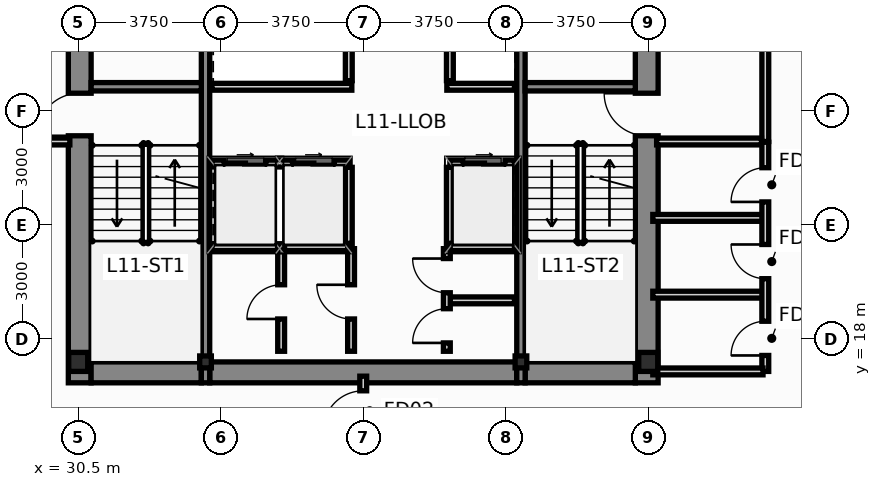
"""IFC4 building model, lengths in metres.
Left out: names, types, materials, properties, quantities, classifications, styles, units other than length and angle.
Written with IfcOpenShell. Run it as: python <this file> out.ifc"""

import sys

from ifc_helpers import new_model, si_unit, direction, frame, frame_2d, origin, origin_2d, place, context, subcontext, project, spatial, rectangle, i_section, extrude, source, transform, mapped, element, fill, save


model = new_model("IFC4")
c1 = context("Model", 3, precision=1e-05, world=origin(), true_north=direction((0.0, 1.0)))
c2 = subcontext(c1, "Body", "Model", "MODEL_VIEW")
j1 = project(units=[si_unit("LENGTHUNIT", "METRE"), si_unit("PLANEANGLEUNIT", "RADIAN")], contexts=[c1])
p1 = place(None, origin())
s1 = spatial("IfcSite", under=j1, at=p1, CompositionType="ELEMENT")
p2 = place(p1, origin())
s2 = spatial("IfcBuilding", under=s1, at=p2, CompositionType="ELEMENT")
p3 = place(p2, frame((0.0, 0.0, 45.85)))
s3 = spatial("IfcBuildingStorey", under=s2, at=p3, CompositionType="ELEMENT", Elevation=45.85)
m1 = source(origin(), c2, "Body", "SweptSolid", [
    extrude(i_section(OverallWidth=0.5, OverallDepth=0.5, WebThickness=0.028, FlangeThickness=0.04, at=origin_2d()), origin(), (0.0, 0.0, 1.0), 3.65),
])
for number, where, z_axis, x_axis in (
    (1, (30.5, 17.4, 0.0), (0.0, 0.0, 1.0), (1.0, 0.0, 0.0)),
    (2, (45.5, 17.4, 0.0), (0.0, 0.0, 1.0), (1.0, 0.0, 0.0)),
):
    element("IfcColumn", number, at=place(p3, frame(where, z_axis=z_axis, x_axis=x_axis)), inside=s3, PredefinedType="COLUMN", context=c2, shape_type="MappedRepresentation", body=[
        mapped(m1, transform((0.0, 0.0, 0.0), scale=1.0)),
    ])
m2 = source(origin(), c2, "Body", "SweptSolid", [
    extrude(i_section(OverallWidth=0.307, OverallDepth=0.315, WebThickness=0.012, FlangeThickness=0.019, at=origin_2d()), origin(), (0.0, 0.0, 1.0), 3.65),
])
for number, where, z_axis, x_axis in (
    (3, (33.85, 17.4, 0.0), (0.0, 0.0, 1.0), (1.0, 0.0, 0.0)),
    (4, (42.15, 17.4, 0.0), (0.0, 0.0, 1.0), (1.0, 0.0, 0.0)),
):
    element("IfcColumn", number, at=place(p3, frame(where, z_axis=z_axis, x_axis=x_axis)), inside=s3, PredefinedType="COLUMN", context=c2, shape_type="MappedRepresentation", body=[
        mapped(m2, transform((0.0, 0.0, 0.0), scale=1.0)),
    ])
p4 = place(p3, frame((30.54, 16.85, 0.0), z_axis=(0.0, 0.0, 1.0), x_axis=(0.0, 1.0, 0.0)))
e5 = element("IfcWall", 5, at=p4, inside=s3, PredefinedType="SHEAR", context=c2, shape_type="SweptSolid", body=[
    extrude(rectangle(XDim=13.425, YDim=0.6, at=frame_2d((6.712, 0.0))), origin(), (0.0, 0.0, 1.0), 3.65),
])
p5 = place(p4, frame((6.5, 0.0, 0.0)))
e6 = element("IfcOpeningElement", 6, at=p5, cuts=e5, PredefinedType="OPENING", context=c2, shape_type="SweptSolid", body=[
    extrude(rectangle(XDim=1.12, YDim=2.15, at=frame_2d((0.56, 1.075))), frame((0.0, 0.312, 0.0), z_axis=(0.0, -1.0, 0.0), x_axis=(1.0, 0.0, 0.0)), (0.0, 0.0, 1.0), 0.624),
])
p6 = place(p4, frame((10.95, 0.0, 0.0)))
e7 = element("IfcOpeningElement", 7, at=p6, cuts=e5, PredefinedType="OPENING", context=c2, shape_type="SweptSolid", body=[
    extrude(rectangle(XDim=1.2, YDim=2.2, at=frame_2d((0.6, 1.1))), frame((0.0, 0.312, 0.0), z_axis=(0.0, -1.0, 0.0), x_axis=(1.0, 0.0, 0.0)), (0.0, 0.0, 1.0), 0.624),
])
p7 = place(p3, frame((45.46, 16.85, 0.0), z_axis=(0.0, 0.0, 1.0), x_axis=(0.0, 1.0, 0.0)))
e8 = element("IfcWall", 8, at=p7, inside=s3, PredefinedType="SHEAR", context=c2, shape_type="SweptSolid", body=[
    extrude(rectangle(XDim=13.425, YDim=0.6, at=frame_2d((6.712, 0.0))), origin(), (0.0, 0.0, 1.0), 3.65),
])
p8 = place(p7, frame((6.5, 0.0, 0.0)))
e9 = element("IfcOpeningElement", 9, at=p8, cuts=e8, PredefinedType="OPENING", context=c2, shape_type="SweptSolid", body=[
    extrude(rectangle(XDim=1.12, YDim=2.15, at=frame_2d((0.56, 1.075))), frame((0.0, 0.312, 0.0), z_axis=(0.0, -1.0, 0.0), x_axis=(1.0, 0.0, 0.0)), (0.0, 0.0, 1.0), 0.624),
])
p9 = place(p7, frame((10.95, 0.0, 0.0)))
e10 = element("IfcOpeningElement", 10, at=p9, cuts=e8, PredefinedType="OPENING", context=c2, shape_type="SweptSolid", body=[
    extrude(rectangle(XDim=1.2, YDim=2.2, at=frame_2d((0.6, 1.1))), frame((0.0, 0.312, 0.0), z_axis=(0.0, -1.0, 0.0), x_axis=(1.0, 0.0, 0.0)), (0.0, 0.0, 1.0), 0.624),
])
p10 = place(p3, frame((30.84, 17.125, 0.0), z_axis=(0.0, 0.0, 1.0), x_axis=(1.0, 0.0, 0.0)))
e11 = element("IfcWall", 11, at=p10, inside=s3, PredefinedType="SHEAR", context=c2, shape_type="SweptSolid", body=[
    extrude(rectangle(XDim=2.9, YDim=0.55, at=frame_2d((1.45, 0.0))), origin(), (0.0, 0.0, 1.0), 3.65),
])
p11 = place(p3, frame((33.96, 17.125, 0.0), z_axis=(0.0, 0.0, 1.0), x_axis=(1.0, 0.0, 0.0)))
e12 = element("IfcWall", 12, at=p11, inside=s3, PredefinedType="SHEAR", context=c2, shape_type="SweptSolid", body=[
    extrude(rectangle(XDim=8.08, YDim=0.55, at=frame_2d((4.04, 0.0))), origin(), (0.0, 0.0, 1.0), 3.65),
])
p12 = place(p3, frame((42.26, 17.125, 0.0), z_axis=(0.0, 0.0, 1.0), x_axis=(1.0, 0.0, 0.0)))
e13 = element("IfcWall", 13, at=p12, inside=s3, PredefinedType="SHEAR", context=c2, shape_type="SweptSolid", body=[
    extrude(rectangle(XDim=2.9, YDim=0.55, at=frame_2d((1.45, 0.0))), origin(), (0.0, 0.0, 1.0), 3.65),
])
for number, where, z_axis, x_axis in (
    (14, (33.85, 16.85, 0.0), (0.0, 0.0, 1.0), (0.0, 1.0, 0.0)),
    (15, (42.15, 16.85, 0.0), (0.0, 0.0, 1.0), (0.0, 1.0, 0.0)),
):
    element("IfcWall", number, at=place(p3, frame(where, z_axis=z_axis, x_axis=x_axis)), inside=s3, PredefinedType="SHEAR", context=c2, shape_type="SweptSolid", body=[
        extrude(rectangle(XDim=13.425, YDim=0.22, at=frame_2d((6.712, 0.0))), origin(), (0.0, 0.0, 1.0), 3.65),
    ])
for number, where, z_axis, x_axis in (
    (16, (30.84, 24.64, 0.0), (0.0, 0.0, 1.0), (1.0, 0.0, 0.0)),
    (17, (42.26, 24.64, 0.0), (0.0, 0.0, 1.0), (1.0, 0.0, 0.0)),
):
    element("IfcWall", number, at=place(p3, frame(where, z_axis=z_axis, x_axis=x_axis)), inside=s3, PredefinedType="SHEAR", context=c2, shape_type="SweptSolid", body=[
        extrude(rectangle(XDim=2.9, YDim=0.22, at=frame_2d((1.45, 0.0))), origin(), (0.0, 0.0, 1.0), 3.65),
    ])
p13 = place(p3, frame((34.02, 22.62, 0.0), z_axis=(0.0, 0.0, 1.0), x_axis=(1.0, 0.0, 0.0)))
e18 = element("IfcWall", 18, at=p13, inside=s3, PredefinedType="PARTITIONING", context=c2, shape_type="SweptSolid", body=[
    extrude(rectangle(XDim=3.6, YDim=0.18, at=frame_2d((1.8, 0.0))), origin(), (0.0, 0.0, 1.0), 3.4),
])
p14 = place(p13, frame((0.32, 0.0, 0.0)))
e19 = element("IfcOpeningElement", 19, at=p14, cuts=e18, PredefinedType="OPENING", context=c2, shape_type="SweptSolid", body=[
    extrude(rectangle(XDim=1.1, YDim=2.2, at=frame_2d((0.55, 1.1))), frame((0.0, 0.102, 0.0), z_axis=(0.0, -1.0, 0.0), x_axis=(1.0, 0.0, 0.0)), (0.0, 0.0, 1.0), 0.204),
])
p15 = place(p13, frame((2.12, 0.0, 0.0)))
e20 = element("IfcOpeningElement", 20, at=p15, cuts=e18, PredefinedType="OPENING", context=c2, shape_type="SweptSolid", body=[
    extrude(rectangle(XDim=1.1, YDim=2.2, at=frame_2d((0.55, 1.1))), frame((0.0, 0.102, 0.0), z_axis=(0.0, -1.0, 0.0), x_axis=(1.0, 0.0, 0.0)), (0.0, 0.0, 1.0), 0.204),
])
p16 = place(p3, frame((40.28, 22.62, 0.0), z_axis=(0.0, 0.0, 1.0), x_axis=(1.0, 0.0, 0.0)))
e21 = element("IfcWall", 21, at=p16, inside=s3, PredefinedType="PARTITIONING", context=c2, shape_type="SweptSolid", body=[
    extrude(rectangle(XDim=1.7, YDim=0.18, at=frame_2d((0.85, 0.0))), origin(), (0.0, 0.0, 1.0), 3.4),
])
p17 = place(p16, frame((0.35, 0.0, 0.0)))
e22 = element("IfcOpeningElement", 22, at=p17, cuts=e21, PredefinedType="OPENING", context=c2, shape_type="SweptSolid", body=[
    extrude(rectangle(XDim=1.1, YDim=2.2, at=frame_2d((0.55, 1.1))), frame((0.0, 0.102, 0.0), z_axis=(0.0, -1.0, 0.0), x_axis=(1.0, 0.0, 0.0)), (0.0, 0.0, 1.0), 0.204),
])
for number, where, z_axis, x_axis in (
    (23, (37.62, 20.52, 0.0), (0.0, 0.0, 1.0), (0.0, 1.0, 0.0)),
    (24, (40.28, 20.52, 0.0), (0.0, 0.0, 1.0), (0.0, 1.0, 0.0)),
    (25, (37.62, 24.8, 0.0), (0.0, 0.0, 1.0), (0.0, 1.0, 0.0)),
    (26, (40.28, 24.8, 0.0), (0.0, 0.0, 1.0), (0.0, 1.0, 0.0)),
):
    element("IfcWall", number, at=place(p3, frame(where, z_axis=z_axis, x_axis=x_axis)), inside=s3, PredefinedType="PARTITIONING", context=c2, shape_type="SweptSolid", body=[
        extrude(rectangle(XDim=2.0, YDim=0.18, at=frame_2d((1.0, 0.0))), origin(), (0.0, 0.0, 1.0), 3.4),
    ])
p18 = place(p3, frame((34.02, 24.64, 0.0), z_axis=(0.0, 0.0, 1.0), x_axis=(1.0, 0.0, 0.0)))
e27 = element("IfcWall", 27, at=p18, inside=s3, PredefinedType="PARTITIONING", context=c2, shape_type="SweptSolid", body=[
    extrude(rectangle(XDim=3.68, YDim=0.18, at=frame_2d((1.84, 0.0))), origin(), (0.0, 0.0, 1.0), 3.4),
])
p19 = place(p3, frame((40.2, 24.64, 0.0), z_axis=(0.0, 0.0, 1.0), x_axis=(1.0, 0.0, 0.0)))
e28 = element("IfcWall", 28, at=p19, inside=s3, PredefinedType="PARTITIONING", context=c2, shape_type="SweptSolid", body=[
    extrude(rectangle(XDim=1.78, YDim=0.18, at=frame_2d((0.89, 0.0))), origin(), (0.0, 0.0, 1.0), 3.4),
])
p20 = place(p3, frame((27.52, 23.2, 0.0), z_axis=(0.0, 0.0, 1.0), x_axis=(1.0, 0.0, 0.0)))
e29 = element("IfcWall", 29, at=p20, inside=s3, PredefinedType="PARTITIONING", context=c2, shape_type="SweptSolid", body=[
    extrude(rectangle(XDim=2.76, YDim=0.18, at=frame_2d((1.38, 0.0))), origin(), (0.0, 0.0, 1.0), 3.4),
])
p21 = place(p3, frame((48.58, 23.2, 0.0), z_axis=(0.0, 0.0, 1.0), x_axis=(0.0, 1.0, 0.0)))
e30 = element("IfcWall", 30, at=p21, inside=s3, PredefinedType="PARTITIONING", context=c2, shape_type="SweptSolid", body=[
    extrude(rectangle(XDim=6.4, YDim=0.18, at=frame_2d((3.2, 0.0))), origin(), (0.0, 0.0, 1.0), 3.026),
])
p22 = place(p21, frame((2.65, 0.0, 0.0)))
e31 = element("IfcOpeningElement", 31, at=p22, cuts=e30, PredefinedType="OPENING", context=c2, shape_type="SweptSolid", body=[
    extrude(rectangle(XDim=1.05, YDim=2.15, at=frame_2d((0.525, 1.075))), frame((0.0, 0.102, 0.0), z_axis=(0.0, -1.0, 0.0), x_axis=(1.0, 0.0, 0.0)), (0.0, 0.0, 1.0), 0.204),
])
p23 = place(p3, frame((45.72, 23.2, 0.0), z_axis=(0.0, 0.0, 1.0), x_axis=(1.0, 0.0, 0.0)))
e32 = element("IfcWall", 32, at=p23, inside=s3, PredefinedType="PARTITIONING", context=c2, shape_type="SweptSolid", body=[
    extrude(rectangle(XDim=2.76, YDim=0.18, at=frame_2d((1.38, 0.0))), origin(), (0.0, 0.0, 1.0), 3.4),
])
p24 = place(p3, frame((34.02, 20.42, 0.0), z_axis=(0.0, 0.0, 1.0), x_axis=(1.0, 0.0, 0.0)))
e33 = element("IfcWall", 33, at=p24, inside=s3, PredefinedType="PARTITIONING", context=c2, shape_type="SweptSolid", body=[
    extrude(rectangle(XDim=3.64, YDim=0.18, at=frame_2d((1.82, 0.0))), origin(), (0.0, 0.0, 1.0), 3.4),
])
p25 = place(p3, frame((40.22, 20.42, 0.0), z_axis=(0.0, 0.0, 1.0), x_axis=(1.0, 0.0, 0.0)))
e34 = element("IfcWall", 34, at=p25, inside=s3, PredefinedType="PARTITIONING", context=c2, shape_type="SweptSolid", body=[
    extrude(rectangle(XDim=1.76, YDim=0.18, at=frame_2d((0.88, 0.0))), origin(), (0.0, 0.0, 1.0), 3.4),
])
p26 = place(p3, frame((35.84, 17.68, 0.0), z_axis=(0.0, 0.0, 1.0), x_axis=(0.0, 1.0, 0.0)))
e35 = element("IfcWall", 35, at=p26, inside=s3, PredefinedType="PARTITIONING", context=c2, shape_type="SweptSolid", body=[
    extrude(rectangle(XDim=2.7, YDim=0.18, at=frame_2d((1.35, 0.0))), origin(), (0.0, 0.0, 1.0), 3.4),
])
p27 = place(p26, frame((0.85, 0.0, 0.0)))
e36 = element("IfcOpeningElement", 36, at=p27, cuts=e35, PredefinedType="OPENING", context=c2, shape_type="SweptSolid", body=[
    extrude(rectangle(XDim=0.9, YDim=2.1, at=frame_2d((0.45, 1.05))), frame((0.0, 0.102, 0.0), z_axis=(0.0, -1.0, 0.0), x_axis=(1.0, 0.0, 0.0)), (0.0, 0.0, 1.0), 0.204),
])
p28 = place(p3, frame((37.68, 17.68, 0.0), z_axis=(0.0, 0.0, 1.0), x_axis=(0.0, 1.0, 0.0)))
e37 = element("IfcWall", 37, at=p28, inside=s3, PredefinedType="PARTITIONING", context=c2, shape_type="SweptSolid", body=[
    extrude(rectangle(XDim=2.7, YDim=0.18, at=frame_2d((1.35, 0.0))), origin(), (0.0, 0.0, 1.0), 3.4),
])
p29 = place(p28, frame((0.85, 0.0, 0.0)))
e38 = element("IfcOpeningElement", 38, at=p29, cuts=e37, PredefinedType="OPENING", context=c2, shape_type="SweptSolid", body=[
    extrude(rectangle(XDim=0.9, YDim=2.1, at=frame_2d((0.45, 1.05))), frame((0.0, 0.102, 0.0), z_axis=(0.0, -1.0, 0.0), x_axis=(1.0, 0.0, 0.0)), (0.0, 0.0, 1.0), 0.204),
])
p30 = place(p3, frame((40.28, 19.02, 0.0), z_axis=(0.0, 0.0, 1.0), x_axis=(1.0, 0.0, 0.0)))
e39 = element("IfcWall", 39, at=p30, inside=s3, PredefinedType="PARTITIONING", context=c2, shape_type="SweptSolid", body=[
    extrude(rectangle(XDim=1.7, YDim=0.18, at=frame_2d((0.85, 0.0))), origin(), (0.0, 0.0, 1.0), 3.4),
])
p31 = place(p3, frame((40.2, 17.68, 0.0), z_axis=(0.0, 0.0, 1.0), x_axis=(0.0, 1.0, 0.0)))
e40 = element("IfcWall", 40, at=p31, inside=s3, PredefinedType="PARTITIONING", context=c2, shape_type="SweptSolid", body=[
    extrude(rectangle(XDim=2.7, YDim=0.18, at=frame_2d((1.35, 0.0))), origin(), (0.0, 0.0, 1.0), 3.4),
])
p32 = place(p31, frame((0.22, 0.0, 0.0)))
e41 = element("IfcOpeningElement", 41, at=p32, cuts=e40, PredefinedType="OPENING", context=c2, shape_type="SweptSolid", body=[
    extrude(rectangle(XDim=0.9, YDim=2.1, at=frame_2d((0.45, 1.05))), frame((0.0, 0.102, 0.0), z_axis=(0.0, -1.0, 0.0), x_axis=(1.0, 0.0, 0.0)), (0.0, 0.0, 1.0), 0.204),
])
p33 = place(p31, frame((1.54, 0.0, 0.0)))
e42 = element("IfcOpeningElement", 42, at=p33, cuts=e40, PredefinedType="OPENING", context=c2, shape_type="SweptSolid", body=[
    extrude(rectangle(XDim=0.9, YDim=2.1, at=frame_2d((0.45, 1.05))), frame((0.0, 0.102, 0.0), z_axis=(0.0, -1.0, 0.0), x_axis=(1.0, 0.0, 0.0)), (0.0, 0.0, 1.0), 0.204),
])
for number, where, z_axis, x_axis in (
    (43, (45.62, 19.17, 0.0), (0.0, 0.0, 1.0), (1.0, 0.0, 0.0)),
    (44, (45.62, 21.19, 0.0), (0.0, 0.0, 1.0), (1.0, 0.0, 0.0)),
):
    element("IfcWall", number, at=place(p3, frame(where, z_axis=z_axis, x_axis=x_axis)), inside=s3, PredefinedType="PARTITIONING", context=c2, shape_type="SweptSolid", body=[
        extrude(rectangle(XDim=2.9, YDim=0.18, at=frame_2d((1.45, 0.0))), origin(), (0.0, 0.0, 1.0), 3.4),
    ])
p34 = place(p3, frame((48.58, 17.15, 0.0), z_axis=(0.0, 0.0, 1.0), x_axis=(0.0, 1.0, 0.0)))
e45 = element("IfcWall", 45, at=p34, inside=s3, PredefinedType="PARTITIONING", context=c2, shape_type="SweptSolid", body=[
    extrude(rectangle(XDim=6.03, YDim=0.18, at=frame_2d((3.015, 0.0))), origin(), (0.0, 0.0, 1.0), 3.4),
])
p35 = place(p34, frame((0.42, 0.0, 0.0)))
e46 = element("IfcOpeningElement", 46, at=p35, cuts=e45, PredefinedType="OPENING", context=c2, shape_type="SweptSolid", body=[
    extrude(rectangle(XDim=0.9, YDim=2.1, at=frame_2d((0.45, 1.05))), frame((0.0, 0.102, 0.0), z_axis=(0.0, -1.0, 0.0), x_axis=(1.0, 0.0, 0.0)), (0.0, 0.0, 1.0), 0.204),
])
p36 = place(p34, frame((2.44, 0.0, 0.0)))
e47 = element("IfcOpeningElement", 47, at=p36, cuts=e45, PredefinedType="OPENING", context=c2, shape_type="SweptSolid", body=[
    extrude(rectangle(XDim=0.9, YDim=2.1, at=frame_2d((0.45, 1.05))), frame((0.0, 0.102, 0.0), z_axis=(0.0, -1.0, 0.0), x_axis=(1.0, 0.0, 0.0)), (0.0, 0.0, 1.0), 0.204),
])
p37 = place(p34, frame((4.46, 0.0, 0.0)))
e48 = element("IfcOpeningElement", 48, at=p37, cuts=e45, PredefinedType="OPENING", context=c2, shape_type="SweptSolid", body=[
    extrude(rectangle(XDim=0.9, YDim=2.1, at=frame_2d((0.45, 1.05))), frame((0.0, 0.102, 0.0), z_axis=(0.0, -1.0, 0.0), x_axis=(1.0, 0.0, 0.0)), (0.0, 0.0, 1.0), 0.204),
])
p38 = place(p3, frame((45.62, 17.15, 0.0), z_axis=(0.0, 0.0, 1.0), x_axis=(1.0, 0.0, 0.0)))
e49 = element("IfcWall", 49, at=p38, inside=s3, PredefinedType="PARTITIONING", context=c2, shape_type="SweptSolid", body=[
    extrude(rectangle(XDim=2.9, YDim=0.18, at=frame_2d((1.45, 0.0))), origin(), (0.0, 0.0, 1.0), 2.783),
])
p39 = place(p3, frame((38.0, 15.205, 0.0), z_axis=(0.0, 0.0, 1.0), x_axis=(0.0, 1.0, 0.0)))
e50 = element("IfcWall", 50, at=p39, inside=s3, PredefinedType="PARTITIONING", context=c2, shape_type="SweptSolid", body=[
    extrude(rectangle(XDim=1.82, YDim=0.18, at=frame_2d((0.91, 0.0))), origin(), (0.0, 0.0, 1.0), 3.4),
])
p40 = place(p39, frame((0.385, 0.0, 0.0)))
e51 = element("IfcOpeningElement", 51, at=p40, cuts=e50, PredefinedType="OPENING", context=c2, shape_type="SweptSolid", body=[
    extrude(rectangle(XDim=1.05, YDim=2.15, at=frame_2d((0.525, 1.075))), frame((0.0, 0.102, 0.0), z_axis=(0.0, -1.0, 0.0), x_axis=(1.0, 0.0, 0.0)), (0.0, 0.0, 1.0), 0.204),
])
p41 = place(p5, origin())
e52 = element("IfcDoor", 52, at=p41, inside=s3, OperationType="SINGLE_SWING_LEFT", PredefinedType="DOOR", context=c2, shape_type="SweptSolid", body=[
    extrude(rectangle(XDim=1.12, YDim=2.15, at=frame_2d((0.56, 1.075))), frame((0.0, 0.025, 0.0), z_axis=(0.0, -1.0, 0.0), x_axis=(1.0, 0.0, 0.0)), (0.0, 0.0, 1.0), 0.05),
])
fill(e6, e52)
p42 = place(p8, origin())
e53 = element("IfcDoor", 53, at=p42, inside=s3, OperationType="SINGLE_SWING_RIGHT", PredefinedType="DOOR", context=c2, shape_type="SweptSolid", body=[
    extrude(rectangle(XDim=1.12, YDim=2.15, at=frame_2d((0.56, 1.075))), frame((0.0, 0.025, 0.0), z_axis=(0.0, -1.0, 0.0), x_axis=(1.0, 0.0, 0.0)), (0.0, 0.0, 1.0), 0.05),
])
fill(e9, e53)
p43 = place(p14, origin())
e54 = element("IfcDoor", 54, at=p43, inside=s3, OperationType="SLIDING_TO_LEFT", PredefinedType="DOOR", context=c2, shape_type="SweptSolid", body=[
    extrude(rectangle(XDim=1.1, YDim=2.2, at=frame_2d((0.55, 1.1))), frame((0.0, 0.025, 0.0), z_axis=(0.0, -1.0, 0.0), x_axis=(1.0, 0.0, 0.0)), (0.0, 0.0, 1.0), 0.05),
])
fill(e19, e54)
p44 = place(p15, origin())
e55 = element("IfcDoor", 55, at=p44, inside=s3, OperationType="SLIDING_TO_RIGHT", PredefinedType="DOOR", context=c2, shape_type="SweptSolid", body=[
    extrude(rectangle(XDim=1.1, YDim=2.2, at=frame_2d((0.55, 1.1))), frame((0.0, 0.025, 0.0), z_axis=(0.0, -1.0, 0.0), x_axis=(1.0, 0.0, 0.0)), (0.0, 0.0, 1.0), 0.05),
])
fill(e20, e55)
p45 = place(p17, origin())
e56 = element("IfcDoor", 56, at=p45, inside=s3, OperationType="SLIDING_TO_LEFT", PredefinedType="DOOR", context=c2, shape_type="SweptSolid", body=[
    extrude(rectangle(XDim=1.1, YDim=2.2, at=frame_2d((0.55, 1.1))), frame((0.0, 0.025, 0.0), z_axis=(0.0, -1.0, 0.0), x_axis=(1.0, 0.0, 0.0)), (0.0, 0.0, 1.0), 0.05),
])
fill(e22, e56)
p46 = place(p27, origin())
e57 = element("IfcDoor", 57, at=p46, inside=s3, OperationType="SINGLE_SWING_LEFT", PredefinedType="DOOR", context=c2, shape_type="SweptSolid", body=[
    extrude(rectangle(XDim=0.9, YDim=2.1, at=frame_2d((0.45, 1.05))), frame((0.0, 0.025, 0.0), z_axis=(0.0, -1.0, 0.0), x_axis=(1.0, 0.0, 0.0)), (0.0, 0.0, 1.0), 0.05),
])
fill(e36, e57)
p47 = place(p29, origin())
e58 = element("IfcDoor", 58, at=p47, inside=s3, OperationType="SINGLE_SWING_RIGHT", PredefinedType="DOOR", context=c2, shape_type="SweptSolid", body=[
    extrude(rectangle(XDim=0.9, YDim=2.1, at=frame_2d((0.45, 1.05))), frame((0.0, 0.025, 0.0), z_axis=(0.0, -1.0, 0.0), x_axis=(1.0, 0.0, 0.0)), (0.0, 0.0, 1.0), 0.05),
])
fill(e38, e58)
p48 = place(p32, origin())
e59 = element("IfcDoor", 59, at=p48, inside=s3, OperationType="SINGLE_SWING_LEFT", PredefinedType="DOOR", context=c2, shape_type="SweptSolid", body=[
    extrude(rectangle(XDim=0.9, YDim=2.1, at=frame_2d((0.45, 1.05))), frame((0.0, 0.025, 0.0), z_axis=(0.0, -1.0, 0.0), x_axis=(1.0, 0.0, 0.0)), (0.0, 0.0, 1.0), 0.05),
])
fill(e41, e59)
p49 = place(p33, origin())
e60 = element("IfcDoor", 60, at=p49, inside=s3, OperationType="SINGLE_SWING_RIGHT", PredefinedType="DOOR", context=c2, shape_type="SweptSolid", body=[
    extrude(rectangle(XDim=0.9, YDim=2.1, at=frame_2d((0.45, 1.05))), frame((0.0, 0.025, 0.0), z_axis=(0.0, -1.0, 0.0), x_axis=(1.0, 0.0, 0.0)), (0.0, 0.0, 1.0), 0.05),
])
fill(e42, e60)
p50 = place(p35, origin())
e61 = element("IfcDoor", 61, at=p50, inside=s3, OperationType="SINGLE_SWING_LEFT", PredefinedType="DOOR", context=c2, shape_type="SweptSolid", body=[
    extrude(rectangle(XDim=0.9, YDim=2.1, at=frame_2d((0.45, 1.05))), frame((0.0, 0.025, 0.0), z_axis=(0.0, -1.0, 0.0), x_axis=(1.0, 0.0, 0.0)), (0.0, 0.0, 1.0), 0.05),
])
fill(e46, e61)
p51 = place(p36, origin())
e62 = element("IfcDoor", 62, at=p51, inside=s3, OperationType="SINGLE_SWING_RIGHT", PredefinedType="DOOR", context=c2, shape_type="SweptSolid", body=[
    extrude(rectangle(XDim=0.9, YDim=2.1, at=frame_2d((0.45, 1.05))), frame((0.0, 0.025, 0.0), z_axis=(0.0, -1.0, 0.0), x_axis=(1.0, 0.0, 0.0)), (0.0, 0.0, 1.0), 0.05),
])
fill(e47, e62)
p52 = place(p37, origin())
e63 = element("IfcDoor", 63, at=p52, inside=s3, OperationType="SINGLE_SWING_LEFT", PredefinedType="DOOR", context=c2, shape_type="SweptSolid", body=[
    extrude(rectangle(XDim=0.9, YDim=2.1, at=frame_2d((0.45, 1.05))), frame((0.0, 0.025, 0.0), z_axis=(0.0, -1.0, 0.0), x_axis=(1.0, 0.0, 0.0)), (0.0, 0.0, 1.0), 0.05),
])
fill(e48, e63)
p53 = place(p40, origin())
e64 = element("IfcDoor", 64, at=p53, inside=s3, OperationType="SINGLE_SWING_LEFT", PredefinedType="DOOR", context=c2, shape_type="SweptSolid", body=[
    extrude(rectangle(XDim=1.05, YDim=2.15, at=frame_2d((0.525, 1.075))), frame((0.0, 0.025, 0.0), z_axis=(0.0, -1.0, 0.0), x_axis=(1.0, 0.0, 0.0)), (0.0, 0.0, 1.0), 0.05),
])
fill(e51, e64)
save(model, sys.argv[1])
